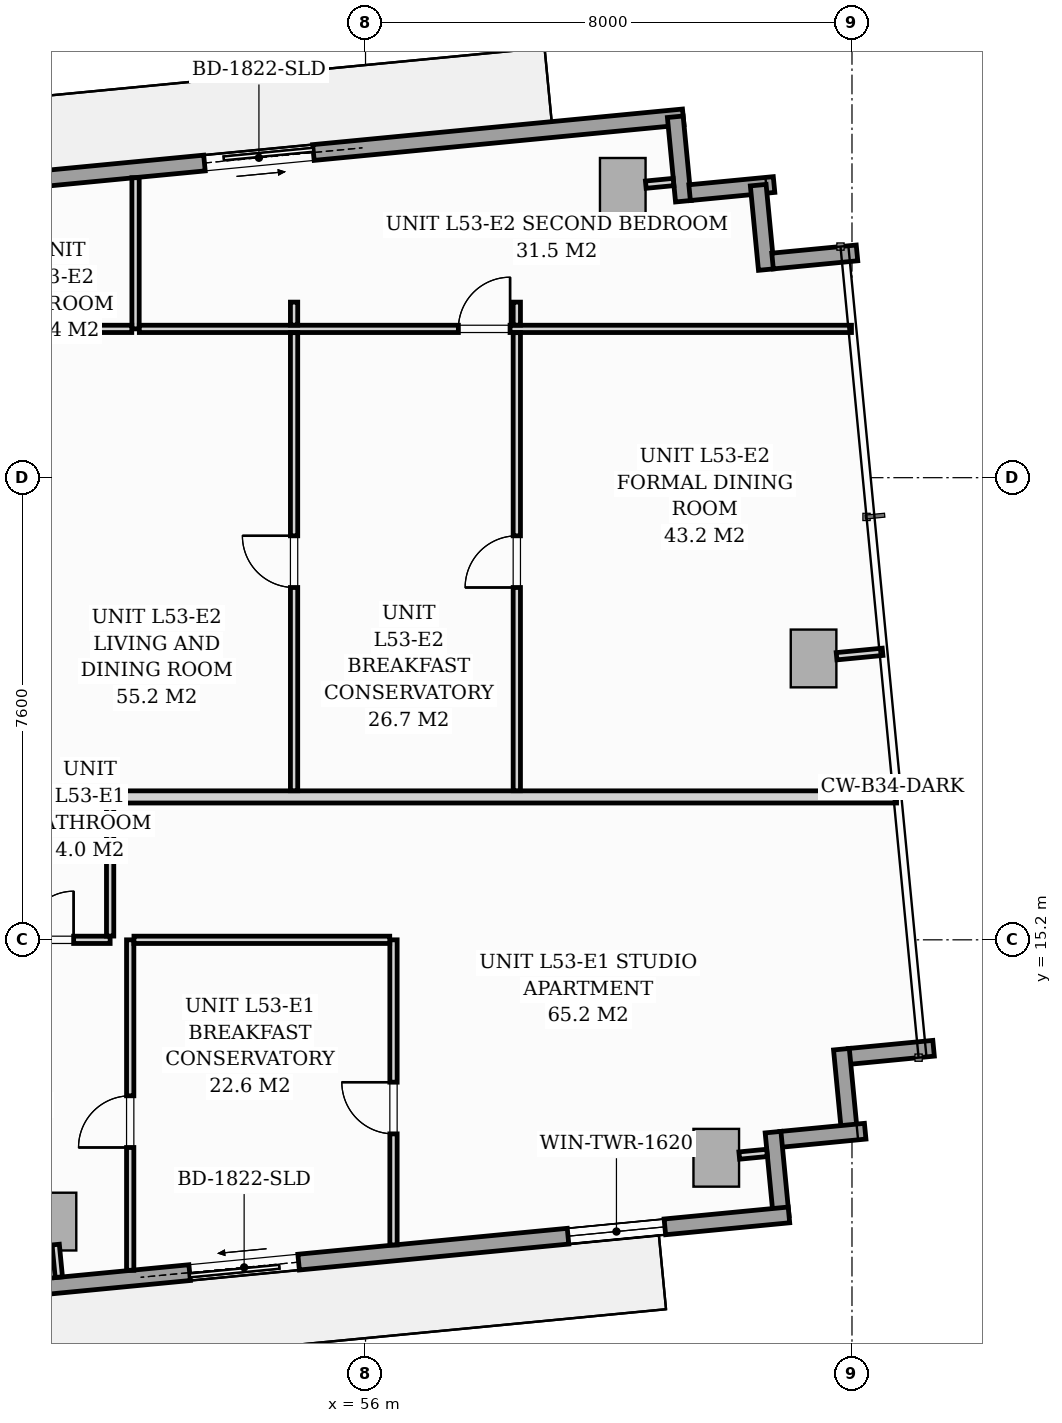
"""IFC4 building model, lengths in metres.
Left out: names, types, materials, properties, quantities, classifications, styles, units other than length and angle.
Written with IfcOpenShell. Run it as: python <this file> out.ifc"""

import sys

from ifc_helpers import new_model, si_unit, direction, frame, frame_2d, origin, origin_2d, place, context, subcontext, project, spatial, rectangle, extrude, source, transform, mapped, element, fill, save


model = new_model("IFC4")
c1 = context("Model", 3, precision=1e-05, world=origin(), true_north=direction((0.0, 1.0)))
c2 = subcontext(c1, "Body", "Model", "MODEL_VIEW")
j1 = project(units=[si_unit("LENGTHUNIT", "METRE"), si_unit("PLANEANGLEUNIT", "RADIAN")], contexts=[c1])
p1 = place(None, origin())
s1 = spatial("IfcSite", under=j1, at=p1, CompositionType="ELEMENT")
p2 = place(p1, origin())
s2 = spatial("IfcBuilding", under=s1, at=p2, CompositionType="ELEMENT")
p3 = place(p2, frame((0.0, 0.0, 185.8)))
s3 = spatial("IfcBuildingStorey", under=s2, at=p3, CompositionType="ELEMENT", Elevation=185.8)
m1 = source(origin(), c2, "Body", "SweptSolid", [
    extrude(rectangle(XDim=0.75, YDim=0.95, at=origin_2d()), origin(), (0.0, 0.0, 1.0), 3.196),
])
for number, where, z_axis, x_axis in (
    (1, (50.868, 10.566, 0.002), (0.0, 0.0, 1.0), (0.995, 0.096, 0.0)),
    (2, (61.768, 11.616, 0.002), (0.0, 0.0, 1.0), (0.995, 0.096, 0.0)),
    (3, (60.23, 27.582, 0.002), (0.0, 0.0, 1.0), (0.995, 0.096, 0.0)),
    (4, (63.368, 19.827, 0.002), (0.0, 0.0, 1.0), (0.995, 0.096, 0.0)),
):
    element("IfcColumn", number, at=place(p3, frame(where, z_axis=z_axis, x_axis=x_axis)), inside=s3, PredefinedType="COLUMN", context=c2, shape_type="MappedRepresentation", body=[
        mapped(m1, transform((0.0, 0.0, 0.0), scale=1.0)),
    ])
p4 = place(p3, frame((45.199, 27.19, 0.0), z_axis=(0.0, 0.0, 1.0), x_axis=(0.995397074604, 0.095836652014, 0.0)))
e5 = element("IfcWall", 5, at=p4, inside=s3, PredefinedType="STANDARD", context=c2, shape_type="SweptSolid", body=[
    extrude(rectangle(XDim=16.1, YDim=0.26, at=frame_2d((8.05, 0.0))), origin(), (0.0, 0.0, 1.0), 2.94),
])
p5 = place(p4, frame((8.19, 0.0, 0.0)))
e6 = element("IfcOpeningElement", 6, at=p5, cuts=e5, PredefinedType="OPENING", context=c2, shape_type="SweptSolid", body=[
    extrude(rectangle(XDim=1.8, YDim=2.06, at=frame_2d((0.9, 1.03))), frame((0.0, 0.14, 0.0), z_axis=(0.0, -1.0, 0.0), x_axis=(1.0, 0.0, 0.0)), (0.0, 0.0, 1.0), 0.28),
])
p6 = place(p4, frame((0.7, 0.0, 0.65)))
e7 = element("IfcOpeningElement", 7, at=p6, cuts=e5, PredefinedType="OPENING", context=c2, shape_type="SweptSolid", body=[
    extrude(rectangle(XDim=1.6, YDim=1.5, at=frame_2d((0.8, 0.75))), frame((0.0, 0.14, 0.0), z_axis=(0.0, -1.0, 0.0), x_axis=(1.0, 0.0, 0.0)), (0.0, 0.0, 1.0), 0.28),
])
p7 = place(p3, frame((61.094, 28.735, 0.0), z_axis=(0.0, 0.0, 1.0), x_axis=(0.095742423056, -0.99540614245, 0.0)))
e8 = element("IfcWall", 8, at=p7, inside=s3, PredefinedType="STANDARD", context=c2, shape_type="SweptSolid", body=[
    extrude(rectangle(XDim=1.395, YDim=0.26, at=frame_2d((0.697, 0.0))), origin(), (0.0, 0.0, 1.0), 2.94),
])
p8 = place(p3, frame((61.33, 27.487, 0.0), z_axis=(0.0, 0.0, 1.0), x_axis=(0.995391056452, 0.09589913835, 0.0)))
e9 = element("IfcWall", 9, at=p8, inside=s3, PredefinedType="STANDARD", context=c2, shape_type="SweptSolid", body=[
    extrude(rectangle(XDim=1.395, YDim=0.26, at=frame_2d((0.698, 0.0))), origin(), (0.0, 0.0, 1.0), 2.94),
])
for number, where, z_axis, x_axis in (
    (10, (62.458, 27.611, 0.0), (0.0, 0.0, 1.0), (0.096, -0.995, 0.0)),
    (11, (62.694, 26.363, 0.0), (0.0, 0.0, 1.0), (0.995, 0.096, 0.0)),
):
    element("IfcWall", number, at=place(p3, frame(where, z_axis=z_axis, x_axis=x_axis)), inside=s3, PredefinedType="STANDARD", context=c2, shape_type="SweptSolid", body=[
        extrude(rectangle(XDim=1.395, YDim=0.26, at=frame_2d((0.697, 0.0))), origin(), (0.0, 0.0, 1.0), 2.94),
    ])
p9 = place(p3, frame((65.342, 13.417, 0.0), z_axis=(0.0, 0.0, 1.0), x_axis=(-0.99540774648, -0.095725744959, 0.0)))
e12 = element("IfcWall", 12, at=p9, inside=s3, PredefinedType="STANDARD", context=c2, shape_type="SweptSolid", body=[
    extrude(rectangle(XDim=1.395, YDim=0.26, at=frame_2d((0.698, 0.0))), origin(), (0.0, 0.0, 1.0), 2.94),
])
p10 = place(p3, frame((63.826, 13.401, 0.0), z_axis=(0.0, 0.0, 1.0), x_axis=(0.095915846097, -0.995389446633, 0.0)))
e13 = element("IfcWall", 13, at=p10, inside=s3, PredefinedType="STANDARD", context=c2, shape_type="SweptSolid", body=[
    extrude(rectangle(XDim=1.395, YDim=0.26, at=frame_2d((0.697, 0.0))), origin(), (0.0, 0.0, 1.0), 2.94),
])
for number, where, z_axis, x_axis in (
    (14, (64.217, 12.053, 0.0), (0.0, 0.0, 1.0), (-0.995, -0.096, 0.0)),
    (15, (62.702, 12.037, 0.0), (0.0, 0.0, 1.0), (0.096, -0.995, 0.0)),
):
    element("IfcWall", number, at=place(p3, frame(where, z_axis=z_axis, x_axis=x_axis)), inside=s3, PredefinedType="STANDARD", context=c2, shape_type="SweptSolid", body=[
        extrude(rectangle(XDim=1.395, YDim=0.26, at=frame_2d((0.698, 0.0))), origin(), (0.0, 0.0, 1.0), 2.94),
    ])
p11 = place(p3, frame((62.963, 10.676, 0.0), z_axis=(0.0, 0.0, 1.0), x_axis=(-0.995395627913, -0.095851676732, 0.0)))
e16 = element("IfcWall", 16, at=p11, inside=s3, PredefinedType="STANDARD", context=c2, shape_type="SweptSolid", body=[
    extrude(rectangle(XDim=16.1, YDim=0.26, at=frame_2d((8.05, 0.0))), origin(), (0.0, 0.0, 1.0), 2.94),
])
p12 = place(p11, frame((8.101, 0.0, 0.0)))
e17 = element("IfcOpeningElement", 17, at=p12, cuts=e16, PredefinedType="OPENING", context=c2, shape_type="SweptSolid", body=[
    extrude(rectangle(XDim=1.8, YDim=2.06, at=frame_2d((0.9, 1.03))), frame((0.0, 0.14, 0.0), z_axis=(0.0, -1.0, 0.0), x_axis=(1.0, 0.0, 0.0)), (0.0, 0.0, 1.0), 0.28),
])
p13 = place(p11, frame((2.05, 0.0, 0.65)))
e18 = element("IfcOpeningElement", 18, at=p13, cuts=e16, PredefinedType="OPENING", context=c2, shape_type="SweptSolid", body=[
    extrude(rectangle(XDim=1.6, YDim=1.5, at=frame_2d((0.8, 0.75))), frame((0.0, 0.14, 0.0), z_axis=(0.0, -1.0, 0.0), x_axis=(1.0, 0.0, 0.0)), (0.0, 0.0, 1.0), 0.28),
])
p14 = place(p3, frame((47.532, 17.55, 0.0), z_axis=(0.0, 0.0, 1.0), x_axis=(1.0, 0.0, 0.0)))
e19 = element("IfcWall", 19, at=p14, inside=s3, PredefinedType="PARTITIONING", context=c2, shape_type="SweptSolid", body=[
    extrude(rectangle(XDim=17.201, YDim=0.2, at=frame_2d((8.601, 0.0))), origin(), (0.0, 0.0, 1.0), 2.281),
])
p15 = place(p3, frame((47.6, 15.2, 0.0), z_axis=(0.0, 0.0, 1.0), x_axis=(1.0, 0.0, 0.0)))
e20 = element("IfcWall", 20, at=p15, inside=s3, PredefinedType="PARTITIONING", context=c2, shape_type="SweptSolid", body=[
    extrude(rectangle(XDim=4.2, YDim=0.12, at=frame_2d((2.1, 0.0))), origin(), (0.0, 0.0, 1.0), 2.94),
])
p16 = place(p15, frame((0.675, 0.0, 0.0)))
e21 = element("IfcOpeningElement", 21, at=p16, cuts=e20, PredefinedType="OPENING", context=c2, shape_type="SweptSolid", body=[
    extrude(rectangle(XDim=0.85, YDim=2.05, at=frame_2d((0.425, 1.025))), frame((0.0, 0.07, 0.0), z_axis=(0.0, -1.0, 0.0), x_axis=(1.0, 0.0, 0.0)), (0.0, 0.0, 1.0), 0.14),
])
p17 = place(p15, frame((2.8, 0.0, 0.0)))
e22 = element("IfcOpeningElement", 22, at=p17, cuts=e20, PredefinedType="OPENING", context=c2, shape_type="SweptSolid", body=[
    extrude(rectangle(XDim=0.8, YDim=2.02, at=frame_2d((0.4, 1.01))), frame((0.0, 0.07, 0.0), z_axis=(0.0, -1.0, 0.0), x_axis=(1.0, 0.0, 0.0)), (0.0, 0.0, 1.0), 0.14),
])
p18 = place(p3, frame((51.8, 15.262, 0.0), z_axis=(0.0, 0.0, 1.0), x_axis=(0.0, 1.0, 0.0)))
e23 = element("IfcWall", 23, at=p18, inside=s3, PredefinedType="PARTITIONING", context=c2, shape_type="SweptSolid", body=[
    extrude(rectangle(XDim=2.186, YDim=0.12, at=frame_2d((1.093, 0.0))), origin(), (0.0, 0.0, 1.0), 2.94),
])
p19 = place(p3, frame((52.13, 9.766, 0.0), z_axis=(0.0, 0.0, 1.0), x_axis=(0.0, 1.0, 0.0)))
e24 = element("IfcWall", 24, at=p19, inside=s3, PredefinedType="PARTITIONING", context=c2, shape_type="SweptSolid", body=[
    extrude(rectangle(XDim=5.434, YDim=0.12, at=frame_2d((2.717, 0.0))), origin(), (0.0, 0.0, 1.0), 2.94),
])
p20 = place(p19, frame((2.019, 0.0, 0.0)))
e25 = element("IfcOpeningElement", 25, at=p20, cuts=e24, PredefinedType="OPENING", context=c2, shape_type="SweptSolid", body=[
    extrude(rectangle(XDim=0.85, YDim=2.05, at=frame_2d((0.425, 1.025))), frame((0.0, 0.07, 0.0), z_axis=(0.0, -1.0, 0.0), x_axis=(1.0, 0.0, 0.0)), (0.0, 0.0, 1.0), 0.14),
])
p21 = place(p3, frame((56.46, 10.183, 0.0), z_axis=(0.0, 0.0, 1.0), x_axis=(0.0, 1.0, 0.0)))
e26 = element("IfcWall", 26, at=p21, inside=s3, PredefinedType="PARTITIONING", context=c2, shape_type="SweptSolid", body=[
    extrude(rectangle(XDim=5.017, YDim=0.12, at=frame_2d((2.509, 0.0))), origin(), (0.0, 0.0, 1.0), 2.94),
])
p22 = place(p21, frame((1.826, 0.0, 0.0)))
e27 = element("IfcOpeningElement", 27, at=p22, cuts=e26, PredefinedType="OPENING", context=c2, shape_type="SweptSolid", body=[
    extrude(rectangle(XDim=0.85, YDim=2.05, at=frame_2d((0.425, 1.025))), frame((0.0, 0.07, 0.0), z_axis=(0.0, -1.0, 0.0), x_axis=(1.0, 0.0, 0.0)), (0.0, 0.0, 1.0), 0.14),
])
p23 = place(p3, frame((52.192, 15.2, 0.0), z_axis=(0.0, 0.0, 1.0), x_axis=(1.0, 0.0, 0.0)))
e28 = element("IfcWall", 28, at=p23, inside=s3, PredefinedType="PARTITIONING", context=c2, shape_type="SweptSolid", body=[
    extrude(rectangle(XDim=4.206, YDim=0.12, at=frame_2d((2.103, 0.0))), origin(), (0.0, 0.0, 1.0), 2.94),
])
p24 = place(p3, frame((52.218, 25.247, 0.0), z_axis=(0.0, 0.0, 1.0), x_axis=(0.0, 1.0, 0.0)))
e29 = element("IfcWall", 29, at=p24, inside=s3, PredefinedType="PARTITIONING", context=c2, shape_type="SweptSolid", body=[
    extrude(rectangle(XDim=2.486, YDim=0.12, at=frame_2d((1.243, 0.0))), origin(), (0.0, 0.0, 1.0), 2.94),
])
p25 = place(p3, frame((40.412, 25.247, 0.0), z_axis=(0.0, 0.0, 1.0), x_axis=(1.0, 0.0, 0.0)))
e30 = element("IfcWall", 30, at=p25, inside=s3, PredefinedType="PARTITIONING", context=c2, shape_type="SweptSolid", body=[
    extrude(rectangle(XDim=11.744, YDim=0.12, at=frame_2d((5.872, 0.0))), origin(), (0.0, 0.0, 1.0), 2.94),
])
p26 = place(p25, frame((6.1, 0.0, 0.0)))
e31 = element("IfcOpeningElement", 31, at=p26, cuts=e30, PredefinedType="OPENING", context=c2, shape_type="SweptSolid", body=[
    extrude(rectangle(XDim=0.85, YDim=2.05, at=frame_2d((0.425, 1.025))), frame((0.0, 0.07, 0.0), z_axis=(0.0, -1.0, 0.0), x_axis=(1.0, 0.0, 0.0)), (0.0, 0.0, 1.0), 0.14),
])
p27 = place(p3, frame((52.28, 25.247, 0.0), z_axis=(0.0, 0.0, 1.0), x_axis=(1.0, 0.0, 0.0)))
e32 = element("IfcWall", 32, at=p27, inside=s3, PredefinedType="PARTITIONING", context=c2, shape_type="SweptSolid", body=[
    extrude(rectangle(XDim=11.712, YDim=0.12, at=frame_2d((5.856, 0.0))), origin(), (0.0, 0.0, 1.0), 2.94),
])
p28 = place(p27, frame((5.247, 0.0, 0.0)))
e33 = element("IfcOpeningElement", 33, at=p28, cuts=e32, PredefinedType="OPENING", context=c2, shape_type="SweptSolid", body=[
    extrude(rectangle(XDim=0.85, YDim=2.05, at=frame_2d((0.425, 1.025))), frame((0.0, 0.07, 0.0), z_axis=(0.0, -1.0, 0.0), x_axis=(1.0, 0.0, 0.0)), (0.0, 0.0, 1.0), 0.14),
])
p29 = place(p3, frame((58.488, 17.652, 0.0), z_axis=(0.0, 0.0, 1.0), x_axis=(0.0, 1.0, 0.0)))
e34 = element("IfcWall", 34, at=p29, inside=s3, PredefinedType="PARTITIONING", context=c2, shape_type="SweptSolid", body=[
    extrude(rectangle(XDim=7.533, YDim=0.12, at=frame_2d((3.767, 0.0))), origin(), (0.0, 0.0, 1.0), 2.94),
])
p30 = place(p29, frame((3.342, 0.0, 0.0)))
e35 = element("IfcOpeningElement", 35, at=p30, cuts=e34, PredefinedType="OPENING", context=c2, shape_type="SweptSolid", body=[
    extrude(rectangle(XDim=0.85, YDim=2.05, at=frame_2d((0.425, 1.025))), frame((0.0, 0.07, 0.0), z_axis=(0.0, -1.0, 0.0), x_axis=(1.0, 0.0, 0.0)), (0.0, 0.0, 1.0), 0.14),
])
p31 = place(p3, frame((58.488, 25.309, 0.0), z_axis=(0.0, 0.0, 1.0), x_axis=(0.0, 1.0, 0.0)))
e36 = element("IfcWall", 36, at=p31, inside=s3, PredefinedType="PARTITIONING", context=c2, shape_type="SweptSolid", body=[
    extrude(rectangle(XDim=0.378, YDim=0.12, at=frame_2d((0.189, 0.0))), origin(), (0.0, 0.0, 1.0), 2.94),
])
p32 = place(p3, frame((54.825, 17.652, 0.0), z_axis=(0.0, 0.0, 1.0), x_axis=(0.0, 1.0, 0.0)))
e37 = element("IfcWall", 37, at=p32, inside=s3, PredefinedType="PARTITIONING", context=c2, shape_type="SweptSolid", body=[
    extrude(rectangle(XDim=7.533, YDim=0.12, at=frame_2d((3.767, 0.0))), origin(), (0.0, 0.0, 1.0), 2.94),
])
p33 = place(p32, frame((3.342, 0.0, 0.0)))
e38 = element("IfcOpeningElement", 38, at=p33, cuts=e37, PredefinedType="OPENING", context=c2, shape_type="SweptSolid", body=[
    extrude(rectangle(XDim=0.85, YDim=2.05, at=frame_2d((0.425, 1.025))), frame((0.0, 0.07, 0.0), z_axis=(0.0, -1.0, 0.0), x_axis=(1.0, 0.0, 0.0)), (0.0, 0.0, 1.0), 0.14),
])
p34 = place(p3, frame((54.825, 25.309, 0.0), z_axis=(0.0, 0.0, 1.0), x_axis=(0.0, 1.0, 0.0)))
e39 = element("IfcWall", 39, at=p34, inside=s3, PredefinedType="PARTITIONING", context=c2, shape_type="SweptSolid", body=[
    extrude(rectangle(XDim=0.378, YDim=0.12, at=frame_2d((0.189, 0.0))), origin(), (0.0, 0.0, 1.0), 2.94),
])
p35 = place(p3, frame((50.905, 10.188, 0.0), z_axis=(0.0, 0.0, 1.0), x_axis=(0.095772948675, -0.995403205893, 0.0)))
e40 = element("IfcWall", 40, at=p35, inside=s3, PredefinedType="PARTITIONING", context=c2, shape_type="SweptSolid", body=[
    extrude(rectangle(XDim=0.538, YDim=0.12, at=frame_2d((0.269, 0.0))), origin(), (0.0, 0.0, 1.0), 2.94),
])
for number, where, z_axis, x_axis in (
    (41, (62.146, 11.652, 0.0), (0.0, 0.0, 1.0), (0.995, 0.096, 0.0)),
    (42, (60.609, 27.618, 0.0), (0.0, 0.0, 1.0), (0.995, 0.096, 0.0)),
):
    element("IfcWall", number, at=place(p3, frame(where, z_axis=z_axis, x_axis=x_axis)), inside=s3, PredefinedType="PARTITIONING", context=c2, shape_type="SweptSolid", body=[
        extrude(rectangle(XDim=0.458, YDim=0.12, at=frame_2d((0.229, 0.0))), origin(), (0.0, 0.0, 1.0), 2.94),
    ])
p36 = place(p3, frame((63.747, 19.864, 0.0), z_axis=(0.0, 0.0, 1.0), x_axis=(0.995405496295, 0.095749140702, 0.0)))
e43 = element("IfcWall", 43, at=p36, inside=s3, PredefinedType="PARTITIONING", context=c2, shape_type="SweptSolid", body=[
    extrude(rectangle(XDim=0.76, YDim=0.12, at=frame_2d((0.38, 0.0))), origin(), (0.0, 0.0, 1.0), 2.94),
])
m2 = source(origin(), c2, "Body", "SweptSolid", [
    extrude(rectangle(XDim=1.8, YDim=2.06, at=frame_2d((0.9, 1.03))), frame((0.0, 0.025, 0.0), z_axis=(0.0, -1.0, 0.0), x_axis=(1.0, 0.0, 0.0)), (0.0, 0.0, 1.0), 0.05),
])
p37 = place(p5, origin())
e44 = element("IfcDoor", 44, at=p37, inside=s3, OperationType="SLIDING_TO_RIGHT", PredefinedType="DOOR", context=c2, shape_type="MappedRepresentation", body=[
    mapped(m2, transform((0.0, 0.0, 0.0), scale=1.0)),
])
fill(e6, e44)
p38 = place(p12, origin())
e45 = element("IfcDoor", 45, at=p38, inside=s3, OperationType="SLIDING_TO_RIGHT", PredefinedType="DOOR", context=c2, shape_type="MappedRepresentation", body=[
    mapped(m2, transform((0.0, 0.0, 0.0), scale=1.0)),
])
fill(e17, e45)
m3 = source(origin(), c2, "Body", "SweptSolid", [
    extrude(rectangle(XDim=1.6, YDim=1.5, at=frame_2d((0.8, 0.75))), frame((0.0, 0.03, 0.0), z_axis=(0.0, -1.0, 0.0), x_axis=(1.0, 0.0, 0.0)), (0.0, 0.0, 1.0), 0.06),
])
p39 = place(p13, origin())
e46 = element("IfcWindow", 46, at=p39, inside=s3, PartitioningType="SINGLE_PANEL", PredefinedType="WINDOW", context=c2, shape_type="MappedRepresentation", body=[
    mapped(m3, transform((0.0, 0.0, 0.0), scale=1.0)),
])
fill(e18, e46)
m4 = source(origin(), c2, "Body", "SweptSolid", [
    extrude(rectangle(XDim=0.85, YDim=2.05, at=frame_2d((0.425, 1.025))), frame((0.0, 0.025, 0.0), z_axis=(0.0, -1.0, 0.0), x_axis=(1.0, 0.0, 0.0)), (0.0, 0.0, 1.0), 0.05),
])
p40 = place(p20, origin())
e47 = element("IfcDoor", 47, at=p40, inside=s3, OperationType="SINGLE_SWING_LEFT", PredefinedType="DOOR", context=c2, shape_type="MappedRepresentation", body=[
    mapped(m4, transform((0.0, 0.0, 0.0), scale=1.0)),
])
fill(e25, e47)
p41 = place(p22, origin())
e48 = element("IfcDoor", 48, at=p41, inside=s3, OperationType="SINGLE_SWING_RIGHT", PredefinedType="DOOR", context=c2, shape_type="MappedRepresentation", body=[
    mapped(m4, transform((0.0, 0.0, 0.0), scale=1.0)),
])
fill(e27, e48)
m5 = source(origin(), c2, "Body", "SweptSolid", [
    extrude(rectangle(XDim=0.8, YDim=2.02, at=frame_2d((0.4, 1.01))), frame((0.0, 0.025, 0.0), z_axis=(0.0, -1.0, 0.0), x_axis=(1.0, 0.0, 0.0)), (0.0, 0.0, 1.0), 0.05),
])
p42 = place(p17, origin())
e49 = element("IfcDoor", 49, at=p42, inside=s3, OperationType="SINGLE_SWING_RIGHT", PredefinedType="DOOR", context=c2, shape_type="MappedRepresentation", body=[
    mapped(m5, transform((0.0, 0.0, 0.0), scale=1.0)),
])
fill(e22, e49)
p43 = place(p28, origin())
e50 = element("IfcDoor", 50, at=p43, inside=s3, OperationType="SINGLE_SWING_RIGHT", PredefinedType="DOOR", context=c2, shape_type="MappedRepresentation", body=[
    mapped(m4, transform((0.0, 0.0, 0.0), scale=1.0)),
])
fill(e33, e50)
p44 = place(p30, origin())
e51 = element("IfcDoor", 51, at=p44, inside=s3, OperationType="SINGLE_SWING_LEFT", PredefinedType="DOOR", context=c2, shape_type="MappedRepresentation", body=[
    mapped(m4, transform((0.0, 0.0, 0.0), scale=1.0)),
])
fill(e35, e51)
p45 = place(p33, origin())
e52 = element("IfcDoor", 52, at=p45, inside=s3, OperationType="SINGLE_SWING_RIGHT", PredefinedType="DOOR", context=c2, shape_type="MappedRepresentation", body=[
    mapped(m4, transform((0.0, 0.0, 0.0), scale=1.0)),
])
fill(e38, e52)
save(model, sys.argv[1])
